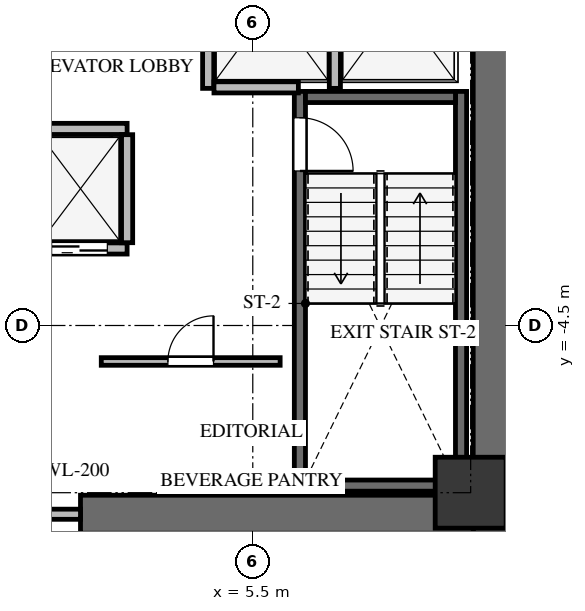
"""IFC4 building model, lengths in metres.
Left out: names, types, materials, properties, quantities, classifications, styles, units other than length and angle.
Written with IfcOpenShell. Run it as: python <this file> out.ifc"""

import sys

from ifc_helpers import new_model, si_unit, direction, frame, frame_2d, origin, origin_2d, place, context, subcontext, project, spatial, rectangle, extrude, source, transform, mapped, element, fill, save


model = new_model("IFC4")
c1 = context("Model", 3, precision=1e-05, world=origin(), true_north=direction((0.0, 1.0)))
c2 = subcontext(c1, "Body", "Model", "MODEL_VIEW")
j1 = project(units=[si_unit("LENGTHUNIT", "METRE"), si_unit("PLANEANGLEUNIT", "RADIAN")], contexts=[c1])
p1 = place(None, origin())
s1 = spatial("IfcSite", under=j1, at=p1, CompositionType="ELEMENT")
p2 = place(p1, origin())
s2 = spatial("IfcBuilding", under=s1, at=p2, CompositionType="ELEMENT")
p3 = place(p2, frame((0.0, 0.0, 104.1)))
s3 = spatial("IfcBuildingStorey", under=s2, at=p3, CompositionType="ELEMENT", Elevation=104.1)
p4 = place(p3, frame((10.225, -8.6, 0.0), z_axis=(0.0, 0.0, 1.0), x_axis=(0.0, 1.0, 0.0)))
e1 = element("IfcWall", 1, at=p4, inside=s3, PredefinedType="SHEAR", context=c2, shape_type="SweptSolid", body=[
    extrude(rectangle(XDim=17.2, YDim=0.75, at=frame_2d((8.6, 0.0))), origin(), (0.0, 0.0, 1.0), 3.3),
])
p5 = place(p3, frame((2.1, -8.225, 0.0), z_axis=(0.0, 0.0, 1.0), x_axis=(1.0, 0.0, 0.0)))
e2 = element("IfcWall", 2, at=p5, inside=s3, PredefinedType="SHEAR", context=c2, shape_type="SweptSolid", body=[
    extrude(rectangle(XDim=7.75, YDim=0.75, at=frame_2d((3.875, 0.0))), origin(), (0.0, 0.0, 1.0), 3.3),
])
p6 = place(p3, frame((9.61, -7.77, -0.24), z_axis=(0.0, 0.0, 1.0), x_axis=(0.0, 1.0, 0.0)))
e3 = element("IfcWall", 3, at=p6, inside=s3, PredefinedType="SHEAR", context=c2, shape_type="SweptSolid", body=[
    extrude(rectangle(XDim=7.89, YDim=0.22, at=frame_2d((3.945, 0.0))), origin(), (0.0, 0.0, 1.0), 3.3),
])
p7 = place(p3, frame((6.43, 0.12, -0.24), z_axis=(0.0, 0.0, 1.0), x_axis=(0.0, -1.0, 0.0)))
e4 = element("IfcWall", 4, at=p7, inside=s3, PredefinedType="SHEAR", context=c2, shape_type="SweptSolid", body=[
    extrude(rectangle(XDim=7.89, YDim=0.22, at=frame_2d((3.945, 0.0))), origin(), (0.0, 0.0, 1.0), 3.3),
])
p8 = place(p7, frame((0.52, 0.0, 0.0)))
e5 = element("IfcOpeningElement", 5, at=p8, cuts=e4, PredefinedType="OPENING", context=c2, shape_type="SweptSolid", body=[
    extrude(rectangle(XDim=1.05, YDim=2.15, at=frame_2d((0.525, 1.075))), frame((0.0, 0.12, 0.0), z_axis=(0.0, -1.0, 0.0), x_axis=(1.0, 0.0, 0.0)), (0.0, 0.0, 1.0), 0.24),
])
for number, where, z_axis, x_axis in (
    (6, (6.54, -7.66, -0.24), (0.0, 0.0, 1.0), (1.0, 0.0, 0.0)),
    (7, (9.5, 0.01, -0.24), (0.0, 0.0, 1.0), (-1.0, 0.0, 0.0)),
):
    element("IfcWall", number, at=place(p3, frame(where, z_axis=z_axis, x_axis=x_axis)), inside=s3, PredefinedType="SHEAR", context=c2, shape_type="SweptSolid", body=[
        extrude(rectangle(XDim=2.96, YDim=0.22, at=frame_2d((1.48, 0.0))), origin(), (0.0, 0.0, 1.0), 3.3),
    ])
m1 = source(origin(), c2, "Body", "SweptSolid", [
    extrude(rectangle(XDim=1.4, YDim=1.4, at=origin_2d()), origin(), (0.0, 0.0, 1.0), 3.3),
])
p9 = place(p3, frame((9.8, -7.8, -0.24), z_axis=(0.0, 0.0, 1.0), x_axis=(1.0, 0.0, 0.0)))
e8 = element("IfcColumn", 8, at=p9, inside=s3, PredefinedType="COLUMN", context=c2, shape_type="MappedRepresentation", body=[
    mapped(m1, transform((0.0, 0.0, 0.0), x_axis=(1.0, 0.0, 0.0), y_axis=(0.0, 1.0, 0.0), z_axis=(0.0, 0.0, 1.0), scale=1.0)),
])
p10 = place(p3, frame((-2.1, -8.225, 0.0), z_axis=(0.0, 0.0, 1.0), x_axis=(1.0, 0.0, 0.0)))
e9 = element("IfcWall", 9, at=p10, inside=s3, PredefinedType="SOLIDWALL", context=c2, shape_type="SweptSolid", body=[
    extrude(rectangle(XDim=4.2, YDim=0.2, at=frame_2d((2.1, 0.0))), origin(), (0.0, 0.0, 1.0), 3.045),
])
p11 = place(p10, frame((1.2, 0.0, 0.0)))
e10 = element("IfcOpeningElement", 10, at=p11, cuts=e9, PredefinedType="OPENING", context=c2, shape_type="SweptSolid", body=[
    extrude(rectangle(XDim=1.8, YDim=2.15, at=frame_2d((0.9, 1.075))), frame((0.0, 0.11, 0.0), z_axis=(0.0, -1.0, 0.0), x_axis=(1.0, 0.0, 0.0)), (0.0, 0.0, 1.0), 0.22),
])
for number, where, z_axis, x_axis in (
    (11, (4.62, 0.18, 0.0), (0.0, 0.0, 1.0), (0.0, 1.0, 0.0)),
    (12, (7.12, 0.18, 0.0), (0.0, 0.0, 1.0), (0.0, 1.0, 0.0)),
):
    element("IfcWall", number, at=place(p3, frame(where, z_axis=z_axis, x_axis=x_axis)), inside=s3, PredefinedType="SOLIDWALL", context=c2, shape_type="SweptSolid", body=[
        extrude(rectangle(XDim=3.186, YDim=0.22, at=frame_2d((1.593, 0.0))), origin(), (0.0, 0.0, 1.0), 3.045),
    ])
p12 = place(p3, frame((4.734, 0.2, 0.0), z_axis=(0.0, 0.0, 1.0), x_axis=(1.0, 0.0, 0.0)))
e13 = element("IfcWall", 13, at=p12, inside=s3, PredefinedType="SOLIDWALL", context=c2, shape_type="SweptSolid", body=[
    extrude(rectangle(XDim=1.666, YDim=0.22, at=frame_2d((0.833, 0.0))), origin(), (0.0, 0.0, 1.0), 3.045),
])
p13 = place(p3, frame((-4.22, -2.98, 0.0), z_axis=(0.0, 0.0, 1.0), x_axis=(1.0, 0.0, 0.0)))
e14 = element("IfcWall", 14, at=p13, inside=s3, PredefinedType="SOLIDWALL", context=c2, shape_type="SweptSolid", body=[
    extrude(rectangle(XDim=7.24, YDim=0.22, at=frame_2d((3.62, 0.0))), origin(), (0.0, 0.0, 1.0), 3.045),
])
p14 = place(p13, frame((0.35, 0.0, 0.0)))
e15 = element("IfcOpeningElement", 15, at=p14, cuts=e14, PredefinedType="OPENING", context=c2, shape_type="SweptSolid", body=[
    extrude(rectangle(XDim=1.1, YDim=2.15, at=frame_2d((0.55, 1.075))), frame((0.0, 0.12, 0.0), z_axis=(0.0, -1.0, 0.0), x_axis=(1.0, 0.0, 0.0)), (0.0, 0.0, 1.0), 0.24),
])
p15 = place(p13, frame((2.15, 0.0, 0.0)))
e16 = element("IfcOpeningElement", 16, at=p15, cuts=e14, PredefinedType="OPENING", context=c2, shape_type="SweptSolid", body=[
    extrude(rectangle(XDim=1.1, YDim=2.15, at=frame_2d((0.55, 1.075))), frame((0.0, 0.12, 0.0), z_axis=(0.0, -1.0, 0.0), x_axis=(1.0, 0.0, 0.0)), (0.0, 0.0, 1.0), 0.24),
])
p16 = place(p13, frame((3.95, 0.0, 0.0)))
e17 = element("IfcOpeningElement", 17, at=p16, cuts=e14, PredefinedType="OPENING", context=c2, shape_type="SweptSolid", body=[
    extrude(rectangle(XDim=1.1, YDim=2.15, at=frame_2d((0.55, 1.075))), frame((0.0, 0.12, 0.0), z_axis=(0.0, -1.0, 0.0), x_axis=(1.0, 0.0, 0.0)), (0.0, 0.0, 1.0), 0.24),
])
p17 = place(p13, frame((5.75, 0.0, 0.0)))
e18 = element("IfcOpeningElement", 18, at=p17, cuts=e14, PredefinedType="OPENING", context=c2, shape_type="SweptSolid", body=[
    extrude(rectangle(XDim=1.1, YDim=2.15, at=frame_2d((0.55, 1.075))), frame((0.0, 0.12, 0.0), z_axis=(0.0, -1.0, 0.0), x_axis=(1.0, 0.0, 0.0)), (0.0, 0.0, 1.0), 0.24),
])
p18 = place(p3, frame((-4.22, -0.62, 0.0), z_axis=(0.0, 0.0, 1.0), x_axis=(1.0, 0.0, 0.0)))
e19 = element("IfcWall", 19, at=p18, inside=s3, PredefinedType="SOLIDWALL", context=c2, shape_type="SweptSolid", body=[
    extrude(rectangle(XDim=7.24, YDim=0.22, at=frame_2d((3.62, 0.0))), origin(), (0.0, 0.0, 1.0), 3.045),
])
p19 = place(p3, frame((3.02, -2.866, 0.0), z_axis=(0.0, 0.0, 1.0), x_axis=(0.0, 1.0, 0.0)))
e20 = element("IfcWall", 20, at=p19, inside=s3, PredefinedType="SOLIDWALL", context=c2, shape_type="SweptSolid", body=[
    extrude(rectangle(XDim=2.132, YDim=0.22, at=frame_2d((1.066, 0.0))), origin(), (0.0, 0.0, 1.0), 3.045),
])
p20 = place(p3, frame((2.51, -5.21, 0.0), z_axis=(0.0, 0.0, 1.0), x_axis=(1.0, 0.0, 0.0)))
e21 = element("IfcWall", 21, at=p20, inside=s3, PredefinedType="PARTITIONING", context=c2, shape_type="SweptSolid", body=[
    extrude(rectangle(XDim=3.53, YDim=0.15, at=frame_2d((1.765, 0.0))), origin(), (0.0, 0.0, 1.0), 3.045),
])
p21 = place(p20, frame((1.315, 0.0, 0.0)))
e22 = element("IfcOpeningElement", 22, at=p21, cuts=e21, PredefinedType="OPENING", context=c2, shape_type="SweptSolid", body=[
    extrude(rectangle(XDim=0.9, YDim=2.05, at=frame_2d((0.45, 1.025))), frame((0.0, 0.085, 0.0), z_axis=(0.0, -1.0, 0.0), x_axis=(1.0, 0.0, 0.0)), (0.0, 0.0, 1.0), 0.17),
])
m2 = source(origin(), c2, "Body", "SweptSolid", [
    extrude(rectangle(XDim=1.05, YDim=2.15, at=frame_2d((0.525, 1.075))), frame((0.0, 0.025, 0.0), z_axis=(0.0, -1.0, 0.0), x_axis=(1.0, 0.0, 0.0)), (0.0, 0.0, 1.0), 0.05),
])
p22 = place(p8, origin())
e23 = element("IfcDoor", 23, at=p22, inside=s3, OperationType="SINGLE_SWING_RIGHT", PredefinedType="DOOR", context=c2, shape_type="MappedRepresentation", body=[
    mapped(m2, transform((0.0, 0.0, 0.0), x_axis=(1.0, 0.0, 0.0), y_axis=(0.0, 1.0, 0.0), z_axis=(0.0, 0.0, 1.0), scale=1.0)),
])
fill(e5, e23)
m3 = source(origin(), c2, "Body", "SweptSolid", [
    extrude(rectangle(XDim=1.1, YDim=2.15, at=frame_2d((0.55, 1.075))), frame((0.0, 0.025, 0.0), z_axis=(0.0, -1.0, 0.0), x_axis=(1.0, 0.0, 0.0)), (0.0, 0.0, 1.0), 0.05),
])
p23 = place(p17, origin())
e24 = element("IfcDoor", 24, at=p23, inside=s3, OperationType="DOUBLE_DOOR_SLIDING", PredefinedType="DOOR", context=c2, shape_type="MappedRepresentation", body=[
    mapped(m3, transform((0.0, 0.0, 0.0), x_axis=(1.0, 0.0, 0.0), y_axis=(0.0, 1.0, 0.0), z_axis=(0.0, 0.0, 1.0), scale=1.0)),
])
fill(e18, e24)
m4 = source(origin(), c2, "Body", "SweptSolid", [
    extrude(rectangle(XDim=0.9, YDim=2.05, at=frame_2d((0.45, 1.025))), frame((0.0, 0.025, 0.0), z_axis=(0.0, -1.0, 0.0), x_axis=(1.0, 0.0, 0.0)), (0.0, 0.0, 1.0), 0.05),
])
p24 = place(p21, origin())
e25 = element("IfcDoor", 25, at=p24, inside=s3, OperationType="SINGLE_SWING_RIGHT", PredefinedType="DOOR", context=c2, shape_type="MappedRepresentation", body=[
    mapped(m4, transform((0.0, 0.0, 0.0), x_axis=(1.0, 0.0, 0.0), y_axis=(0.0, 1.0, 0.0), z_axis=(0.0, 0.0, 1.0), scale=1.0)),
])
fill(e22, e25)
save(model, sys.argv[1])
